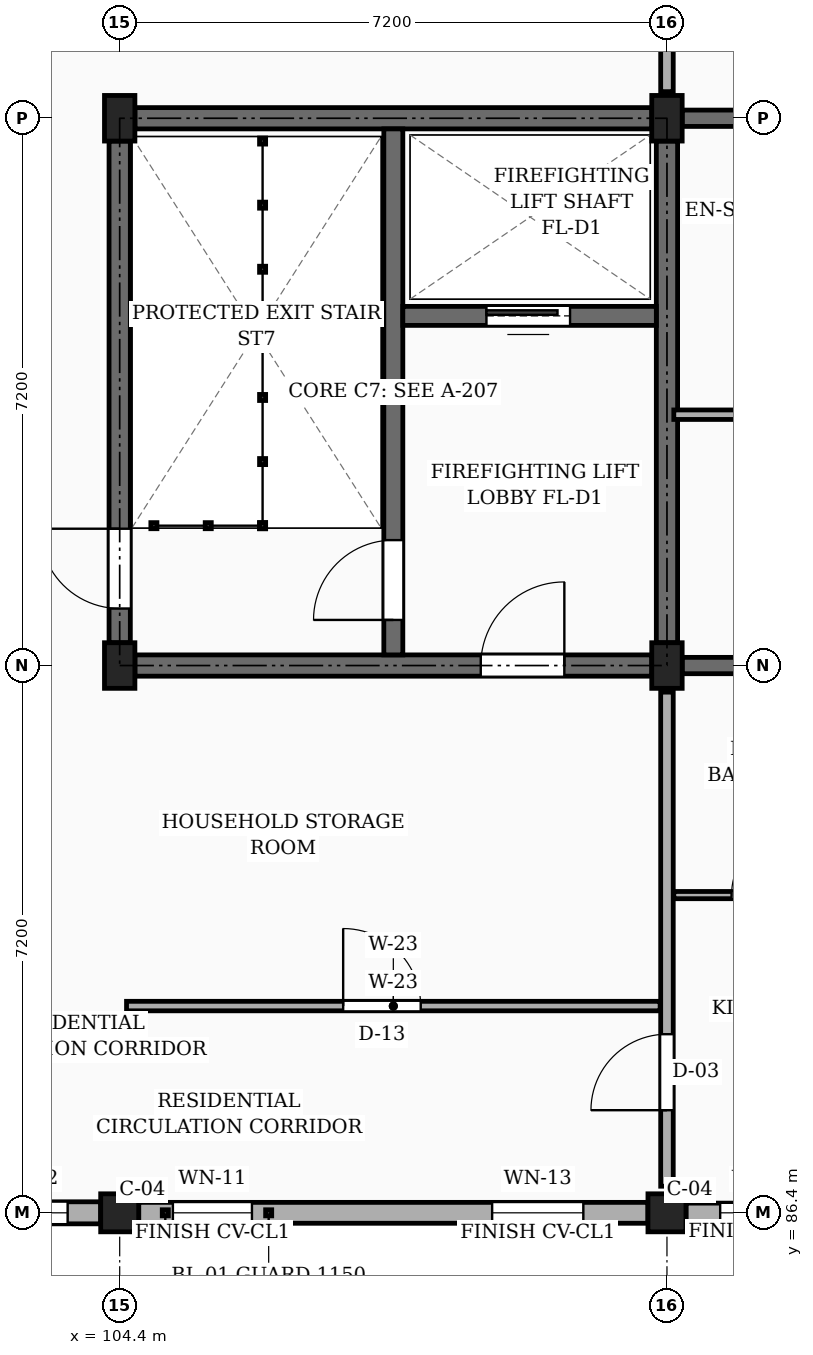
"""IFC4 building model, lengths in metres.
Left out: names, types, materials, properties, quantities, classifications, styles, units other than length and angle.
Written with IfcOpenShell. Run it as: python <this file> out.ifc"""

import sys

from ifc_helpers import new_model, si_unit, direction, frame, frame_2d, origin, origin_2d, place, context, subcontext, project, spatial, rectangle, extrude, element, fill, save


model = new_model("IFC4")
c1 = context("Model", 3, precision=1e-05, world=origin(), true_north=direction((0.0, 1.0)))
c2 = subcontext(c1, "Body", "Model", "MODEL_VIEW")
j1 = project(units=[si_unit("LENGTHUNIT", "METRE"), si_unit("PLANEANGLEUNIT", "RADIAN")], contexts=[c1])
p1 = place(None, origin())
s1 = spatial("IfcSite", under=j1, at=p1, CompositionType="ELEMENT")
p2 = place(p1, origin())
s2 = spatial("IfcBuilding", under=s1, at=p2, CompositionType="ELEMENT")
p3 = place(p2, frame((0.0, 0.0, 32.85)))
s3 = spatial("IfcBuildingStorey", under=s2, at=p3, CompositionType="ELEMENT", Elevation=32.85)
p4 = place(p3, frame((104.4, 86.4, 0.0), z_axis=(0.0, 0.0, 1.0), x_axis=(1.0, 0.0, 0.0)))
e1 = element("IfcColumn", 1, at=p4, inside=s3, PredefinedType="COLUMN", context=c2, shape_type="SweptSolid", body=[
    extrude(rectangle(XDim=0.5, YDim=0.5, at=origin_2d()), origin(), (0.0, 0.0, 1.0), 3.15),
])
for number, where, z_axis, x_axis in (
    (2, (104.4, 93.6, 0.0), (0.0, 0.0, 1.0), (1.0, 0.0, 0.0)),
    (3, (104.4, 100.8, 0.0), (0.0, 0.0, 1.0), (1.0, 0.0, 0.0)),
):
    element("IfcColumn", number, at=place(p3, frame(where, z_axis=z_axis, x_axis=x_axis)), inside=s3, PredefinedType="COLUMN", context=c2, shape_type="SweptSolid", body=[
        extrude(rectangle(XDim=0.4, YDim=0.6, at=origin_2d()), origin(), (0.0, 0.0, 1.0), 3.15),
    ])
p5 = place(p3, frame((111.6, 86.4, 0.0), z_axis=(0.0, 0.0, 1.0), x_axis=(1.0, 0.0, 0.0)))
e4 = element("IfcColumn", 4, at=p5, inside=s3, PredefinedType="COLUMN", context=c2, shape_type="SweptSolid", body=[
    extrude(rectangle(XDim=0.5, YDim=0.5, at=origin_2d()), origin(), (0.0, 0.0, 1.0), 3.15),
])
for number, where, z_axis, x_axis in (
    (5, (111.6, 93.6, 0.0), (0.0, 0.0, 1.0), (1.0, 0.0, 0.0)),
    (6, (111.6, 100.8, 0.0), (0.0, 0.0, 1.0), (1.0, 0.0, 0.0)),
):
    element("IfcColumn", number, at=place(p3, frame(where, z_axis=z_axis, x_axis=x_axis)), inside=s3, PredefinedType="COLUMN", context=c2, shape_type="SweptSolid", body=[
        extrude(rectangle(XDim=0.4, YDim=0.6, at=origin_2d()), origin(), (0.0, 0.0, 1.0), 3.15),
    ])
p6 = place(p3, frame((111.8, 93.6, 0.0), z_axis=(0.0, 0.0, 1.0), x_axis=(1.0, 0.0, 0.0)))
e7 = element("IfcWall", 7, at=p6, inside=s3, PredefinedType="SOLIDWALL", context=c2, shape_type="SweptSolid", body=[
    extrude(rectangle(XDim=6.75, YDim=0.215, at=frame_2d((3.375, 0.0))), origin(), (0.0, 0.0, 1.0), 2.22),
])
p7 = place(p6, frame((4.35, 0.0, 0.0)))
e8 = element("IfcOpeningElement", 8, at=p7, cuts=e7, PredefinedType="OPENING", context=c2, shape_type="SweptSolid", body=[
    extrude(rectangle(XDim=0.98, YDim=2.12, at=frame_2d((0.49, 1.06))), frame((0.0, 0.118, 0.0), z_axis=(0.0, -1.0, 0.0), x_axis=(1.0, 0.0, 0.0)), (0.0, 0.0, 1.0), 0.235),
])
p8 = place(p3, frame((111.8, 100.8, 0.0), z_axis=(0.0, 0.0, 1.0), x_axis=(1.0, 0.0, 0.0)))
e9 = element("IfcWall", 9, at=p8, inside=s3, PredefinedType="SOLIDWALL", context=c2, shape_type="SweptSolid", body=[
    extrude(rectangle(XDim=6.75, YDim=0.215, at=frame_2d((3.375, 0.0))), origin(), (0.0, 0.0, 1.0), 2.22),
])
p9 = place(p3, frame((97.45, 86.4, 0.0), z_axis=(0.0, 0.0, 1.0), x_axis=(1.0, 0.0, 0.0)))
e10 = element("IfcWall", 10, at=p9, inside=s3, PredefinedType="SOLIDWALL", context=c2, shape_type="SweptSolid", body=[
    extrude(rectangle(XDim=6.7, YDim=0.29, at=frame_2d((3.35, 0.0))), origin(), (0.0, 0.0, 1.0), 2.46),
])
p10 = place(p9, frame((0.825, 0.0, 0.78)))
e11 = element("IfcOpeningElement", 11, at=p10, cuts=e10, PredefinedType="OPENING", context=c2, shape_type="SweptSolid", body=[
    extrude(rectangle(XDim=1.4, YDim=1.15, at=frame_2d((0.7, 0.575))), frame((0.0, 0.155, 0.0), z_axis=(0.0, -1.0, 0.0), x_axis=(1.0, 0.0, 0.0)), (0.0, 0.0, 1.0), 0.31),
])
p11 = place(p9, frame((3.4, 0.0, 0.78)))
e12 = element("IfcOpeningElement", 12, at=p11, cuts=e10, PredefinedType="OPENING", context=c2, shape_type="SweptSolid", body=[
    extrude(rectangle(XDim=0.96, YDim=1.26, at=frame_2d((0.48, 0.63))), frame((0.0, 0.155, 0.0), z_axis=(0.0, -1.0, 0.0), x_axis=(1.0, 0.0, 0.0)), (0.0, 0.0, 1.0), 0.31),
])
p12 = place(p9, frame((5.145, 0.0, 0.78)))
e13 = element("IfcOpeningElement", 13, at=p12, cuts=e10, PredefinedType="OPENING", context=c2, shape_type="SweptSolid", body=[
    extrude(rectangle(XDim=1.12, YDim=1.26, at=frame_2d((0.56, 0.63))), frame((0.0, 0.155, 0.0), z_axis=(0.0, -1.0, 0.0), x_axis=(1.0, 0.0, 0.0)), (0.0, 0.0, 1.0), 0.31),
])
p13 = place(p3, frame((104.65, 86.4, 0.0), z_axis=(0.0, 0.0, 1.0), x_axis=(1.0, 0.0, 0.0)))
e14 = element("IfcWall", 14, at=p13, inside=s3, PredefinedType="SOLIDWALL", context=c2, shape_type="SweptSolid", body=[
    extrude(rectangle(XDim=6.7, YDim=0.275, at=frame_2d((3.35, 0.0))), origin(), (0.0, 0.0, 1.0), 2.46),
])
p14 = place(p13, frame((0.45, 0.0, 0.78)))
e15 = element("IfcOpeningElement", 15, at=p14, cuts=e14, PredefinedType="OPENING", context=c2, shape_type="SweptSolid", body=[
    extrude(rectangle(XDim=1.04, YDim=1.26, at=frame_2d((0.52, 0.63))), frame((0.0, 0.147, 0.0), z_axis=(0.0, -1.0, 0.0), x_axis=(1.0, 0.0, 0.0)), (0.0, 0.0, 1.0), 0.295),
])
p15 = place(p13, frame((4.65, 0.0, 0.78)))
e16 = element("IfcOpeningElement", 16, at=p15, cuts=e14, PredefinedType="OPENING", context=c2, shape_type="SweptSolid", body=[
    extrude(rectangle(XDim=1.2, YDim=1.26, at=frame_2d((0.6, 0.63))), frame((0.0, 0.147, 0.0), z_axis=(0.0, -1.0, 0.0), x_axis=(1.0, 0.0, 0.0)), (0.0, 0.0, 1.0), 0.295),
])
p16 = place(p3, frame((111.85, 86.4, 0.0), z_axis=(0.0, 0.0, 1.0), x_axis=(1.0, 0.0, 0.0)))
e17 = element("IfcWall", 17, at=p16, inside=s3, PredefinedType="SOLIDWALL", context=c2, shape_type="SweptSolid", body=[
    extrude(rectangle(XDim=6.7, YDim=0.255, at=frame_2d((3.35, 0.0))), origin(), (0.0, 0.0, 1.0), 2.46),
])
p17 = place(p16, frame((0.45, 0.0, 0.78)))
e18 = element("IfcOpeningElement", 18, at=p17, cuts=e17, PredefinedType="OPENING", context=c2, shape_type="SweptSolid", body=[
    extrude(rectangle(XDim=1.2, YDim=1.26, at=frame_2d((0.6, 0.63))), frame((0.0, 0.137, 0.0), z_axis=(0.0, -1.0, 0.0), x_axis=(1.0, 0.0, 0.0)), (0.0, 0.0, 1.0), 0.275),
])
p18 = place(p16, frame((4.65, 0.0, 0.78)))
e19 = element("IfcOpeningElement", 19, at=p18, cuts=e17, PredefinedType="OPENING", context=c2, shape_type="SweptSolid", body=[
    extrude(rectangle(XDim=1.36, YDim=1.26, at=frame_2d((0.68, 0.63))), frame((0.0, 0.137, 0.0), z_axis=(0.0, -1.0, 0.0), x_axis=(1.0, 0.0, 0.0)), (0.0, 0.0, 1.0), 0.275),
])
p19 = place(p3, frame((104.4, 93.9, 0.0), z_axis=(0.0, 0.0, 1.0), x_axis=(0.0, 1.0, 0.0)))
e20 = element("IfcWall", 20, at=p19, inside=s3, PredefinedType="SHEAR", context=c2, shape_type="SweptSolid", body=[
    extrude(rectangle(XDim=6.6, YDim=0.28, at=frame_2d((3.3, 0.0))), origin(), (0.0, 0.0, 1.0), 2.89),
])
p20 = place(p19, frame((0.45, 0.0, 0.0)))
e21 = element("IfcOpeningElement", 21, at=p20, cuts=e20, PredefinedType="OPENING", context=c2, shape_type="SweptSolid", body=[
    extrude(rectangle(XDim=1.05, YDim=2.15, at=frame_2d((0.525, 1.075))), frame((0.0, 0.15, 0.0), z_axis=(0.0, -1.0, 0.0), x_axis=(1.0, 0.0, 0.0)), (0.0, 0.0, 1.0), 0.3),
])
p21 = place(p3, frame((104.6, 100.8, 0.0), z_axis=(0.0, 0.0, 1.0), x_axis=(1.0, 0.0, 0.0)))
e22 = element("IfcWall", 22, at=p21, inside=s3, PredefinedType="SHEAR", context=c2, shape_type="SweptSolid", body=[
    extrude(rectangle(XDim=6.8, YDim=0.28, at=frame_2d((3.4, 0.0))), origin(), (0.0, 0.0, 1.0), 2.89),
])
p22 = place(p3, frame((111.6, 93.9, 0.0), z_axis=(0.0, 0.0, 1.0), x_axis=(0.0, 1.0, 0.0)))
e23 = element("IfcWall", 23, at=p22, inside=s3, PredefinedType="SHEAR", context=c2, shape_type="SweptSolid", body=[
    extrude(rectangle(XDim=6.6, YDim=0.28, at=frame_2d((3.3, 0.0))), origin(), (0.0, 0.0, 1.0), 2.89),
])
p23 = place(p3, frame((104.6, 93.6, 0.0), z_axis=(0.0, 0.0, 1.0), x_axis=(1.0, 0.0, 0.0)))
e24 = element("IfcWall", 24, at=p23, inside=s3, PredefinedType="SHEAR", context=c2, shape_type="SweptSolid", body=[
    extrude(rectangle(XDim=6.8, YDim=0.28, at=frame_2d((3.4, 0.0))), origin(), (0.0, 0.0, 1.0), 2.89),
])
p24 = place(p23, frame((4.55, 0.0, 0.0)))
e25 = element("IfcOpeningElement", 25, at=p24, cuts=e24, PredefinedType="OPENING", context=c2, shape_type="SweptSolid", body=[
    extrude(rectangle(XDim=1.1, YDim=2.15, at=frame_2d((0.55, 1.075))), frame((0.0, 0.15, 0.0), z_axis=(0.0, -1.0, 0.0), x_axis=(1.0, 0.0, 0.0)), (0.0, 0.0, 1.0), 0.3),
])
p25 = place(p3, frame((108.0, 93.74, 0.0), z_axis=(0.0, 0.0, 1.0), x_axis=(0.0, 1.0, 0.0)))
e26 = element("IfcWall", 26, at=p25, inside=s3, PredefinedType="SHEAR", context=c2, shape_type="SweptSolid", body=[
    extrude(rectangle(XDim=6.92, YDim=0.25, at=frame_2d((3.46, 0.0))), origin(), (0.0, 0.0, 1.0), 2.89),
])
p26 = place(p25, frame((0.46, 0.0, 0.0)))
e27 = element("IfcOpeningElement", 27, at=p26, cuts=e26, PredefinedType="OPENING", context=c2, shape_type="SweptSolid", body=[
    extrude(rectangle(XDim=1.05, YDim=2.15, at=frame_2d((0.525, 1.075))), frame((0.0, 0.135, 0.0), z_axis=(0.0, -1.0, 0.0), x_axis=(1.0, 0.0, 0.0)), (0.0, 0.0, 1.0), 0.27),
])
p27 = place(p3, frame((108.125, 98.2, 0.0), z_axis=(0.0, 0.0, 1.0), x_axis=(1.0, 0.0, 0.0)))
e28 = element("IfcWall", 28, at=p27, inside=s3, PredefinedType="SHEAR", context=c2, shape_type="SweptSolid", body=[
    extrude(rectangle(XDim=3.335, YDim=0.25, at=frame_2d((1.667, 0.0))), origin(), (0.0, 0.0, 1.0), 2.89),
])
p28 = place(p27, frame((1.1, 0.0, 0.0)))
e29 = element("IfcOpeningElement", 29, at=p28, cuts=e28, PredefinedType="OPENING", context=c2, shape_type="SweptSolid", body=[
    extrude(rectangle(XDim=1.1, YDim=2.2, at=frame_2d((0.55, 1.1))), frame((0.0, 0.135, 0.0), z_axis=(0.0, -1.0, 0.0), x_axis=(1.0, 0.0, 0.0)), (0.0, 0.0, 1.0), 0.27),
])
p29 = place(p3, frame((111.6, 86.75, 0.0), z_axis=(0.0, 0.0, 1.0), x_axis=(0.0, 1.0, 0.0)))
e30 = element("IfcWall", 30, at=p29, inside=s3, PredefinedType="PARTITIONING", context=c2, shape_type="SweptSolid", body=[
    extrude(rectangle(XDim=6.5, YDim=0.165, at=frame_2d((3.25, 0.0))), origin(), (0.0, 0.0, 1.0), 2.325),
])
p30 = place(p29, frame((1.0, 0.0, 0.0)))
e31 = element("IfcOpeningElement", 31, at=p30, cuts=e30, PredefinedType="OPENING", context=c2, shape_type="SweptSolid", body=[
    extrude(rectangle(XDim=1.0, YDim=2.15, at=frame_2d((0.5, 1.075))), frame((0.0, 0.093, 0.0), z_axis=(0.0, -1.0, 0.0), x_axis=(1.0, 0.0, 0.0)), (0.0, 0.0, 1.0), 0.185),
])
p31 = place(p3, frame((111.6, 101.15, 0.0), z_axis=(0.0, 0.0, 1.0), x_axis=(0.0, 1.0, 0.0)))
e32 = element("IfcWall", 32, at=p31, inside=s3, PredefinedType="PARTITIONING", context=c2, shape_type="SweptSolid", body=[
    extrude(rectangle(XDim=6.5, YDim=0.165, at=frame_2d((3.25, 0.0))), origin(), (0.0, 0.0, 1.0), 2.325),
])
p32 = place(p31, frame((1.1, 0.0, 0.0)))
e33 = element("IfcOpeningElement", 33, at=p32, cuts=e32, PredefinedType="OPENING", context=c2, shape_type="SweptSolid", body=[
    extrude(rectangle(XDim=0.94, YDim=2.12, at=frame_2d((0.47, 1.06))), frame((0.0, 0.093, 0.0), z_axis=(0.0, -1.0, 0.0), x_axis=(1.0, 0.0, 0.0)), (0.0, 0.0, 1.0), 0.185),
])
p33 = place(p3, frame((104.49, 89.12, 0.0), z_axis=(0.0, 0.0, 1.0), x_axis=(1.0, 0.0, 0.0)))
e34 = element("IfcWall", 34, at=p33, inside=s3, PredefinedType="PARTITIONING", context=c2, shape_type="SweptSolid", body=[
    extrude(rectangle(XDim=7.02, YDim=0.125, at=frame_2d((3.51, 0.0))), origin(), (0.0, 0.0, 1.0), 2.325),
])
p34 = place(p33, frame((2.85, 0.0, 0.0)))
e35 = element("IfcOpeningElement", 35, at=p34, cuts=e34, PredefinedType="OPENING", context=c2, shape_type="SweptSolid", body=[
    extrude(rectangle(XDim=1.02, YDim=2.15, at=frame_2d((0.51, 1.075))), frame((0.0, 0.073, 0.0), z_axis=(0.0, -1.0, 0.0), x_axis=(1.0, 0.0, 0.0)), (0.0, 0.0, 1.0), 0.145),
])
p35 = place(p3, frame((111.69, 90.58, 0.0), z_axis=(0.0, 0.0, 1.0), x_axis=(1.0, 0.0, 0.0)))
e36 = element("IfcWall", 36, at=p35, inside=s3, PredefinedType="PARTITIONING", context=c2, shape_type="SweptSolid", body=[
    extrude(rectangle(XDim=2.42, YDim=0.095, at=frame_2d((1.21, 0.0))), origin(), (0.0, 0.0, 1.0), 2.325),
])
p36 = place(p35, frame((0.76, 0.0, 0.0)))
e37 = element("IfcOpeningElement", 37, at=p36, cuts=e36, PredefinedType="OPENING", context=c2, shape_type="SweptSolid", body=[
    extrude(rectangle(XDim=0.9, YDim=2.05, at=frame_2d((0.45, 1.025))), frame((0.0, 0.058, 0.0), z_axis=(0.0, -1.0, 0.0), x_axis=(1.0, 0.0, 0.0)), (0.0, 0.0, 1.0), 0.115),
])
p37 = place(p3, frame((111.69, 96.9, 0.0), z_axis=(0.0, 0.0, 1.0), x_axis=(1.0, 0.0, 0.0)))
e38 = element("IfcWall", 38, at=p37, inside=s3, PredefinedType="PARTITIONING", context=c2, shape_type="SweptSolid", body=[
    extrude(rectangle(XDim=6.935, YDim=0.125, at=frame_2d((3.468, 0.0))), origin(), (0.0, 0.0, 1.0), 2.325),
])
p38 = place(p37, frame((1.1, 0.0, 0.0)))
e39 = element("IfcOpeningElement", 39, at=p38, cuts=e38, PredefinedType="OPENING", context=c2, shape_type="SweptSolid", body=[
    extrude(rectangle(XDim=0.87, YDim=2.05, at=frame_2d((0.435, 1.025))), frame((0.0, 0.073, 0.0), z_axis=(0.0, -1.0, 0.0), x_axis=(1.0, 0.0, 0.0)), (0.0, 0.0, 1.0), 0.145),
])
p39 = place(p37, frame((4.5, 0.0, 0.0)))
e40 = element("IfcOpeningElement", 40, at=p39, cuts=e38, PredefinedType="OPENING", context=c2, shape_type="SweptSolid", body=[
    extrude(rectangle(XDim=0.88, YDim=2.08, at=frame_2d((0.44, 1.04))), frame((0.0, 0.073, 0.0), z_axis=(0.0, -1.0, 0.0), x_axis=(1.0, 0.0, 0.0)), (0.0, 0.0, 1.0), 0.145),
])
p40 = place(p12, origin())
e41 = element("IfcWindow", 41, at=p40, inside=s3, PartitioningType="SINGLE_PANEL", PredefinedType="WINDOW", context=c2, shape_type="SweptSolid", body=[
    extrude(rectangle(XDim=1.12, YDim=1.26, at=frame_2d((0.56, 0.63))), frame((0.0, 0.03, 0.0), z_axis=(0.0, -1.0, 0.0), x_axis=(1.0, 0.0, 0.0)), (0.0, 0.0, 1.0), 0.06),
])
fill(e13, e41)
p41 = place(p14, origin())
e42 = element("IfcWindow", 42, at=p41, inside=s3, PartitioningType="SINGLE_PANEL", PredefinedType="WINDOW", context=c2, shape_type="SweptSolid", body=[
    extrude(rectangle(XDim=1.04, YDim=1.26, at=frame_2d((0.52, 0.63))), frame((0.0, 0.03, 0.0), z_axis=(0.0, -1.0, 0.0), x_axis=(1.0, 0.0, 0.0)), (0.0, 0.0, 1.0), 0.06),
])
fill(e15, e42)
p42 = place(p15, origin())
e43 = element("IfcWindow", 43, at=p42, inside=s3, PartitioningType="SINGLE_PANEL", PredefinedType="WINDOW", context=c2, shape_type="SweptSolid", body=[
    extrude(rectangle(XDim=1.2, YDim=1.26, at=frame_2d((0.6, 0.63))), frame((0.0, 0.03, 0.0), z_axis=(0.0, -1.0, 0.0), x_axis=(1.0, 0.0, 0.0)), (0.0, 0.0, 1.0), 0.06),
])
fill(e16, e43)
p43 = place(p17, origin())
e44 = element("IfcWindow", 44, at=p43, inside=s3, PartitioningType="SINGLE_PANEL", PredefinedType="WINDOW", context=c2, shape_type="SweptSolid", body=[
    extrude(rectangle(XDim=1.2, YDim=1.26, at=frame_2d((0.6, 0.63))), frame((0.0, 0.03, 0.0), z_axis=(0.0, -1.0, 0.0), x_axis=(1.0, 0.0, 0.0)), (0.0, 0.0, 1.0), 0.06),
])
fill(e18, e44)
p44 = place(p20, origin())
e45 = element("IfcDoor", 45, at=p44, inside=s3, OperationType="SINGLE_SWING_RIGHT", PredefinedType="DOOR", context=c2, shape_type="SweptSolid", body=[
    extrude(rectangle(XDim=1.05, YDim=2.15, at=frame_2d((0.525, 1.075))), frame((0.0, 0.025, 0.0), z_axis=(0.0, -1.0, 0.0), x_axis=(1.0, 0.0, 0.0)), (0.0, 0.0, 1.0), 0.05),
])
fill(e21, e45)
p45 = place(p24, frame((1.1, 0.0, 0.0), z_axis=(0.0, 0.0, 1.0), x_axis=(-1.0, 0.0, 0.0)))
e46 = element("IfcDoor", 46, at=p45, inside=s3, OperationType="SINGLE_SWING_RIGHT", PredefinedType="DOOR", context=c2, shape_type="SweptSolid", body=[
    extrude(rectangle(XDim=1.1, YDim=2.15, at=frame_2d((0.55, 1.075))), frame((0.0, 0.025, 0.0), z_axis=(0.0, -1.0, 0.0), x_axis=(1.0, 0.0, 0.0)), (0.0, 0.0, 1.0), 0.05),
])
fill(e25, e46)
p46 = place(p26, origin())
e47 = element("IfcDoor", 47, at=p46, inside=s3, OperationType="SINGLE_SWING_LEFT", PredefinedType="DOOR", context=c2, shape_type="SweptSolid", body=[
    extrude(rectangle(XDim=1.05, YDim=2.15, at=frame_2d((0.525, 1.075))), frame((0.0, 0.025, 0.0), z_axis=(0.0, -1.0, 0.0), x_axis=(1.0, 0.0, 0.0)), (0.0, 0.0, 1.0), 0.05),
])
fill(e27, e47)
p47 = place(p28, origin())
e48 = element("IfcDoor", 48, at=p47, inside=s3, OperationType="SLIDING_TO_LEFT", PredefinedType="DOOR", context=c2, shape_type="SweptSolid", body=[
    extrude(rectangle(XDim=1.1, YDim=2.2, at=frame_2d((0.55, 1.1))), frame((0.0, 0.025, 0.0), z_axis=(0.0, -1.0, 0.0), x_axis=(1.0, 0.0, 0.0)), (0.0, 0.0, 1.0), 0.05),
])
fill(e29, e48)
p48 = place(p30, origin())
e49 = element("IfcDoor", 49, at=p48, inside=s3, OperationType="SINGLE_SWING_LEFT", PredefinedType="DOOR", context=c2, shape_type="SweptSolid", body=[
    extrude(rectangle(XDim=1.0, YDim=2.15, at=frame_2d((0.5, 1.075))), frame((0.0, 0.025, 0.0), z_axis=(0.0, -1.0, 0.0), x_axis=(1.0, 0.0, 0.0)), (0.0, 0.0, 1.0), 0.05),
])
fill(e31, e49)
p49 = place(p34, origin())
e50 = element("IfcDoor", 50, at=p49, inside=s3, OperationType="SINGLE_SWING_LEFT", PredefinedType="DOOR", context=c2, shape_type="SweptSolid", body=[
    extrude(rectangle(XDim=1.02, YDim=2.15, at=frame_2d((0.51, 1.075))), frame((0.0, 0.025, 0.0), z_axis=(0.0, -1.0, 0.0), x_axis=(1.0, 0.0, 0.0)), (0.0, 0.0, 1.0), 0.05),
])
fill(e35, e50)
p50 = place(p36, origin())
e51 = element("IfcDoor", 51, at=p50, inside=s3, OperationType="SINGLE_SWING_RIGHT", PredefinedType="DOOR", context=c2, shape_type="SweptSolid", body=[
    extrude(rectangle(XDim=0.9, YDim=2.05, at=frame_2d((0.45, 1.025))), frame((0.0, 0.025, 0.0), z_axis=(0.0, -1.0, 0.0), x_axis=(1.0, 0.0, 0.0)), (0.0, 0.0, 1.0), 0.05),
])
fill(e37, e51)
save(model, sys.argv[1])
